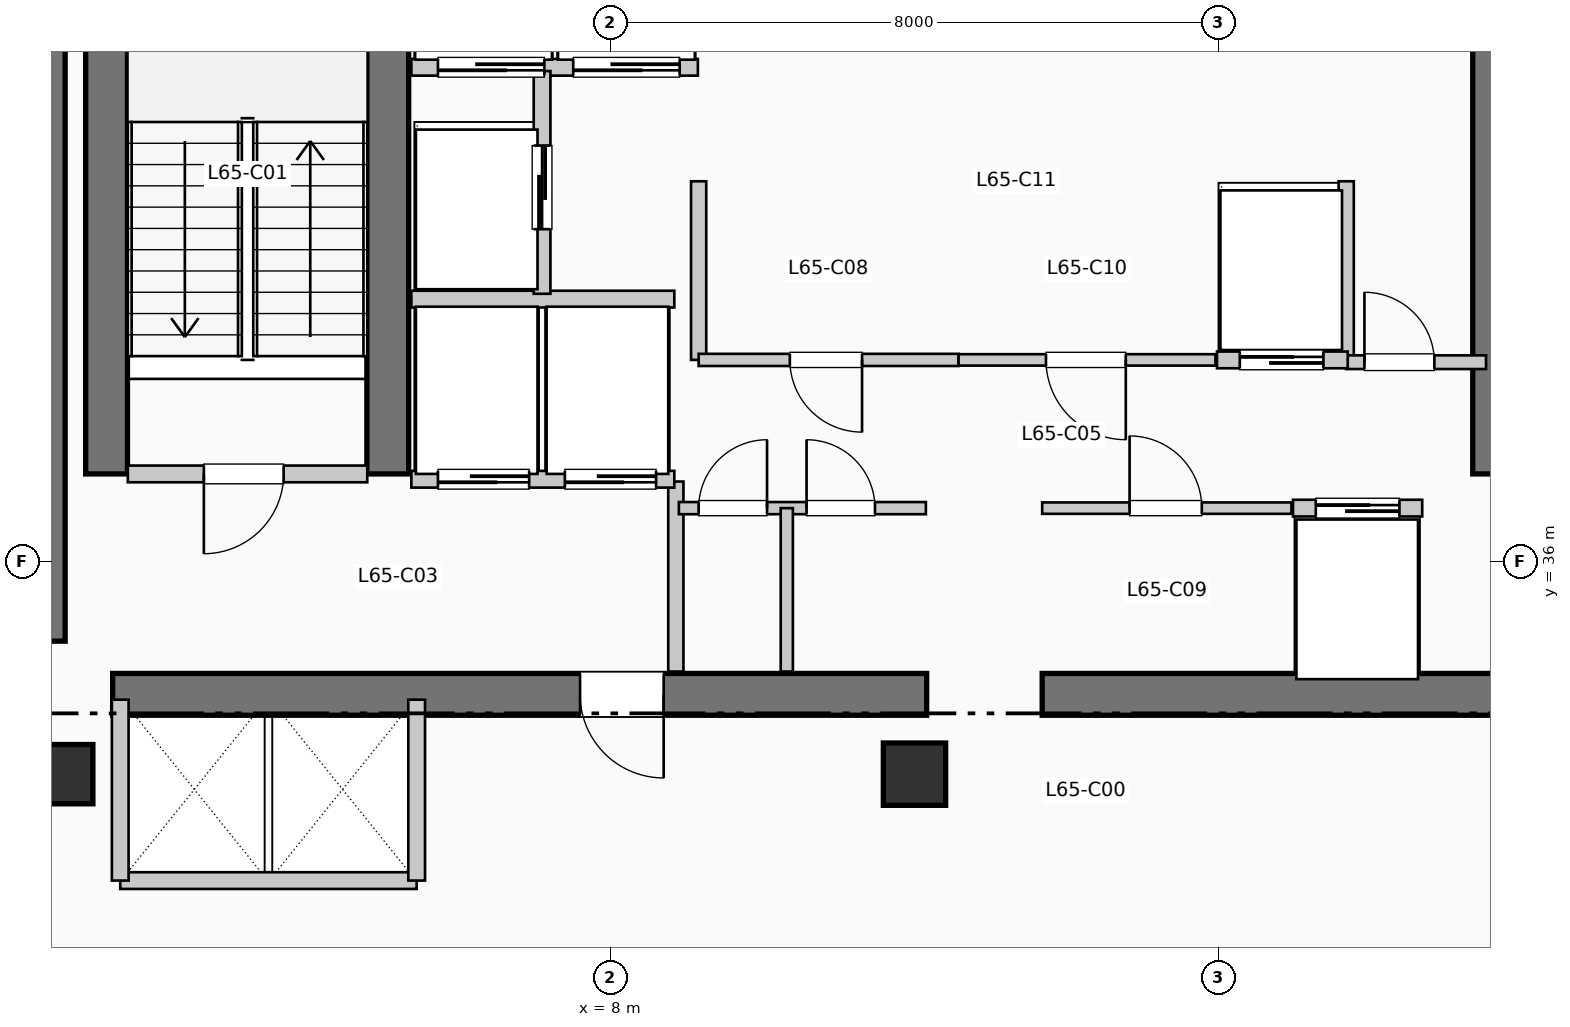
"""IFC4 building model, lengths in metres.
Left out: names, types, materials, properties, quantities, classifications, styles, units other than length and angle.
Written with IfcOpenShell. Run it as: python <this file> out.ifc"""

import sys

from ifc_helpers import new_model, si_unit, direction, frame, frame_2d, origin, origin_2d, place, context, subcontext, project, spatial, rectangle, extrude, element, fill, save


model = new_model("IFC4")
c1 = context("Model", 3, precision=1e-05, world=origin(), true_north=direction((0.0, 1.0)))
c2 = subcontext(c1, "Body", "Model", "MODEL_VIEW")
j1 = project(units=[si_unit("LENGTHUNIT", "METRE"), si_unit("PLANEANGLEUNIT", "RADIAN")], contexts=[c1])
p1 = place(None, origin())
s1 = spatial("IfcSite", under=j1, at=p1, CompositionType="ELEMENT")
p2 = place(p1, origin())
s2 = spatial("IfcBuilding", under=s1, at=p2, CompositionType="ELEMENT")
p3 = place(p2, frame((0.0, 0.0, 268.29)))
s3 = spatial("IfcBuildingStorey", under=s2, at=p3, CompositionType="ELEMENT", Elevation=268.29)
p4 = place(p3, frame((0.5, 34.95, 0.0), z_axis=(0.0, 0.0, 1.0), x_axis=(0.0, 1.0, 0.0)))
e1 = element("IfcWall", 1, at=p4, inside=s3, PredefinedType="SHEAR", context=c2, shape_type="SweptSolid", body=[
    extrude(rectangle(XDim=7.9, YDim=0.65, at=frame_2d((3.95, 0.0))), origin(), (0.0, 0.0, 1.0), 3.96),
])
p5 = place(p3, frame((1.45, 34.25, 0.0), z_axis=(0.0, 0.0, 1.0), x_axis=(1.0, 0.0, 0.0)))
e2 = element("IfcWall", 2, at=p5, inside=s3, PredefinedType="SHEAR", context=c2, shape_type="SweptSolid", body=[
    extrude(rectangle(XDim=10.71, YDim=0.55, at=frame_2d((5.355, 0.0))), origin(), (0.0, 0.0, 1.0), 3.96),
])
p6 = place(p5, frame((7.25, 0.0, 0.0), z_axis=(0.0, 0.0, 1.0), x_axis=(-1.0, 0.0, 0.0)))
e3 = element("IfcOpeningElement", 3, at=p6, cuts=e2, PredefinedType="OPENING", context=c2, shape_type="SweptSolid", body=[
    extrude(rectangle(XDim=1.1, YDim=2.15, at=frame_2d((0.55, 1.075))), frame((0.0, 0.285, 0.0), z_axis=(0.0, -1.0, 0.0), x_axis=(1.0, 0.0, 0.0)), (0.0, 0.0, 1.0), 0.57),
])
p7 = place(p3, frame((13.68, 34.25, 0.0), z_axis=(0.0, 0.0, 1.0), x_axis=(1.0, 0.0, 0.0)))
e4 = element("IfcWall", 4, at=p7, inside=s3, PredefinedType="SHEAR", context=c2, shape_type="SweptSolid", body=[
    extrude(rectangle(XDim=6.12, YDim=0.55, at=frame_2d((3.06, 0.0))), origin(), (0.0, 0.0, 1.0), 3.96),
])
for number, where, z_axis, x_axis in (
    (5, (1.37, 37.15, 0.0), (0.0, 0.0, 1.0), (0.0, 1.0, 0.0)),
    (6, (5.07, 37.15, 0.0), (0.0, 0.0, 1.0), (0.0, 1.0, 0.0)),
    (7, (19.62, 37.15, 0.0), (0.0, 0.0, 1.0), (0.0, 1.0, 0.0)),
):
    element("IfcWall", number, at=place(p3, frame(where, z_axis=z_axis, x_axis=x_axis)), inside=s3, PredefinedType="SHEAR", context=c2, shape_type="SweptSolid", body=[
        extrude(rectangle(XDim=7.89, YDim=0.55, at=frame_2d((3.945, 0.0))), origin(), (0.0, 0.0, 1.0), 3.96),
    ])
p8 = place(p3, frame((0.8, 33.2, 0.0), z_axis=(0.0, 0.0, 1.0), x_axis=(1.0, 0.0, 0.0)))
e8 = element("IfcColumn", 8, at=p8, inside=s3, PredefinedType="COLUMN", context=c2, shape_type="SweptSolid", body=[
    extrude(rectangle(XDim=0.78, YDim=0.78, at=origin_2d()), origin(), (0.0, 0.0, 1.0), 3.96),
])
p9 = place(p3, frame((12.0, 33.2, 0.0), z_axis=(0.0, 0.0, 1.0), x_axis=(1.0, 0.0, 0.0)))
e9 = element("IfcColumn", 9, at=p9, inside=s3, PredefinedType="COLUMN", context=c2, shape_type="SweptSolid", body=[
    extrude(rectangle(XDim=0.82, YDim=0.82, at=origin_2d()), origin(), (0.0, 0.0, 1.0), 3.96),
])
p10 = place(p3, frame((1.65, 37.15, 0.0), z_axis=(0.0, 0.0, 1.0), x_axis=(1.0, 0.0, 0.0)))
e10 = element("IfcWall", 10, at=p10, inside=s3, PredefinedType="PARTITIONING", context=c2, shape_type="SweptSolid", body=[
    extrude(rectangle(XDim=3.15, YDim=0.22, at=frame_2d((1.575, 0.0))), origin(), (0.0, 0.0, 1.0), 3.74),
])
p11 = place(p10, frame((2.05, 0.0, 0.0), z_axis=(0.0, 0.0, 1.0), x_axis=(-1.0, 0.0, 0.0)))
e11 = element("IfcOpeningElement", 11, at=p11, cuts=e10, PredefinedType="OPENING", context=c2, shape_type="SweptSolid", body=[
    extrude(rectangle(XDim=1.05, YDim=2.15, at=frame_2d((0.525, 1.075))), frame((0.0, 0.12, 0.0), z_axis=(0.0, -1.0, 0.0), x_axis=(1.0, 0.0, 0.0)), (0.0, 0.0, 1.0), 0.24),
])
p12 = place(p3, frame((8.86, 34.55, 0.0), z_axis=(0.0, 0.0, 1.0), x_axis=(0.0, 1.0, 0.0)))
e12 = element("IfcWall", 12, at=p12, inside=s3, PredefinedType="PARTITIONING", context=c2, shape_type="SweptSolid", body=[
    extrude(rectangle(XDim=2.5, YDim=0.2, at=frame_2d((1.25, 0.0))), origin(), (0.0, 0.0, 1.0), 3.74),
])
p13 = place(p3, frame((5.38, 37.08, 0.0), z_axis=(0.0, 0.0, 1.0), x_axis=(1.0, 0.0, 0.0)))
e13 = element("IfcWall", 13, at=p13, inside=s3, PredefinedType="PARTITIONING", context=c2, shape_type="SweptSolid", body=[
    extrude(rectangle(XDim=3.46, YDim=0.22, at=frame_2d((1.73, 0.0))), origin(), (0.0, 0.0, 1.0), 3.74),
])
p14 = place(p13, frame((1.55, 0.0, 0.0), z_axis=(0.0, 0.0, 1.0), x_axis=(-1.0, 0.0, 0.0)))
e14 = element("IfcOpeningElement", 14, at=p14, cuts=e13, PredefinedType="OPENING", context=c2, shape_type="SweptSolid", body=[
    extrude(rectangle(XDim=1.2, YDim=2.2, at=frame_2d((0.6, 1.1))), frame((0.0, 0.12, 0.0), z_axis=(0.0, -1.0, 0.0), x_axis=(1.0, 0.0, 0.0)), (0.0, 0.0, 1.0), 0.24),
])
p15 = place(p13, frame((3.22, 0.0, 0.0), z_axis=(0.0, 0.0, 1.0), x_axis=(-1.0, 0.0, 0.0)))
e15 = element("IfcOpeningElement", 15, at=p15, cuts=e13, PredefinedType="OPENING", context=c2, shape_type="SweptSolid", body=[
    extrude(rectangle(XDim=1.2, YDim=2.2, at=frame_2d((0.6, 1.1))), frame((0.0, 0.12, 0.0), z_axis=(0.0, -1.0, 0.0), x_axis=(1.0, 0.0, 0.0)), (0.0, 0.0, 1.0), 0.24),
])
p16 = place(p3, frame((5.38, 39.45, 0.0), z_axis=(0.0, 0.0, 1.0), x_axis=(1.0, 0.0, 0.0)))
e16 = element("IfcWall", 16, at=p16, inside=s3, PredefinedType="PARTITIONING", context=c2, shape_type="SweptSolid", body=[
    extrude(rectangle(XDim=3.46, YDim=0.22, at=frame_2d((1.73, 0.0))), origin(), (0.0, 0.0, 1.0), 3.74),
])
p17 = place(p3, frame((5.38, 42.5, 0.0), z_axis=(0.0, 0.0, 1.0), x_axis=(1.0, 0.0, 0.0)))
e17 = element("IfcWall", 17, at=p17, inside=s3, PredefinedType="PARTITIONING", context=c2, shape_type="SweptSolid", body=[
    extrude(rectangle(XDim=3.77, YDim=0.22, at=frame_2d((1.885, 0.0))), origin(), (0.0, 0.0, 1.0), 3.74),
])
p18 = place(p17, frame((1.75, 0.0, 0.0), z_axis=(0.0, 0.0, 1.0), x_axis=(-1.0, 0.0, 0.0)))
e18 = element("IfcOpeningElement", 18, at=p18, cuts=e17, PredefinedType="OPENING", context=c2, shape_type="SweptSolid", body=[
    extrude(rectangle(XDim=1.4, YDim=2.2, at=frame_2d((0.7, 1.1))), frame((0.0, 0.12, 0.0), z_axis=(0.0, -1.0, 0.0), x_axis=(1.0, 0.0, 0.0)), (0.0, 0.0, 1.0), 0.24),
])
p19 = place(p17, frame((3.53, 0.0, 0.0), z_axis=(0.0, 0.0, 1.0), x_axis=(-1.0, 0.0, 0.0)))
e19 = element("IfcOpeningElement", 19, at=p19, cuts=e17, PredefinedType="OPENING", context=c2, shape_type="SweptSolid", body=[
    extrude(rectangle(XDim=1.4, YDim=2.2, at=frame_2d((0.7, 1.1))), frame((0.0, 0.12, 0.0), z_axis=(0.0, -1.0, 0.0), x_axis=(1.0, 0.0, 0.0)), (0.0, 0.0, 1.0), 0.24),
])
p20 = place(p3, frame((7.1, 39.52, 0.0), z_axis=(0.0, 0.0, 1.0), x_axis=(0.0, 1.0, 0.0)))
e20 = element("IfcWall", 20, at=p20, inside=s3, PredefinedType="PARTITIONING", context=c2, shape_type="SweptSolid", body=[
    extrude(rectangle(XDim=2.93, YDim=0.22, at=frame_2d((1.465, 0.0))), origin(), (0.0, 0.0, 1.0), 3.74),
])
p21 = place(p20, frame((0.85, 0.0, 0.0)))
e21 = element("IfcOpeningElement", 21, at=p21, cuts=e20, PredefinedType="OPENING", context=c2, shape_type="SweptSolid", body=[
    extrude(rectangle(XDim=1.1, YDim=2.2, at=frame_2d((0.55, 1.1))), frame((0.0, 0.12, 0.0), z_axis=(0.0, -1.0, 0.0), x_axis=(1.0, 0.0, 0.0)), (0.0, 0.0, 1.0), 0.24),
])
p22 = place(p3, frame((1.55, 31.8, 0.0), z_axis=(0.0, 0.0, 1.0), x_axis=(1.0, 0.0, 0.0)))
e22 = element("IfcWall", 22, at=p22, inside=s3, PredefinedType="PARTITIONING", context=c2, shape_type="SweptSolid", body=[
    extrude(rectangle(XDim=3.9, YDim=0.22, at=frame_2d((1.95, 0.0))), origin(), (0.0, 0.0, 1.0), 3.74),
])
for number, where, z_axis, x_axis in (
    (23, (1.55, 31.8, 0.0), (0.0, 0.0, 1.0), (0.0, 1.0, 0.0)),
    (24, (5.45, 31.8, 0.0), (0.0, 0.0, 1.0), (0.0, 1.0, 0.0)),
):
    element("IfcWall", number, at=place(p3, frame(where, z_axis=z_axis, x_axis=x_axis)), inside=s3, PredefinedType="PARTITIONING", context=c2, shape_type="SweptSolid", body=[
        extrude(rectangle(XDim=2.38, YDim=0.22, at=frame_2d((1.19, 0.0))), origin(), (0.0, 0.0, 1.0), 3.74),
    ])
for number, where, z_axis, x_axis in (
    (25, (9.16, 38.65, 0.0), (0.0, 0.0, 1.0), (0.0, 1.0, 0.0)),
    (26, (17.68, 38.65, 0.0), (0.0, 0.0, 1.0), (0.0, 1.0, 0.0)),
):
    element("IfcWall", number, at=place(p3, frame(where, z_axis=z_axis, x_axis=x_axis)), inside=s3, PredefinedType="PARTITIONING", context=c2, shape_type="SweptSolid", body=[
        extrude(rectangle(XDim=2.35, YDim=0.2, at=frame_2d((1.175, 0.0))), origin(), (0.0, 0.0, 1.0), 3.74),
    ])
p23 = place(p3, frame((17.68, 38.62, 0.0), z_axis=(0.0, 0.0, 1.0), x_axis=(1.0, 0.0, 0.0)))
e27 = element("IfcWall", 27, at=p23, inside=s3, PredefinedType="PARTITIONING", context=c2, shape_type="SweptSolid", body=[
    extrude(rectangle(XDim=1.84, YDim=0.18, at=frame_2d((0.92, 0.0))), origin(), (0.0, 0.0, 1.0), 3.74),
])
p24 = place(p23, frame((0.24, 0.0, 0.0)))
e28 = element("IfcOpeningElement", 28, at=p24, cuts=e27, PredefinedType="OPENING", context=c2, shape_type="SweptSolid", body=[
    extrude(rectangle(XDim=0.92, YDim=2.1, at=frame_2d((0.46, 1.05))), frame((0.0, 0.1, 0.0), z_axis=(0.0, -1.0, 0.0), x_axis=(1.0, 0.0, 0.0)), (0.0, 0.0, 1.0), 0.2),
])
p25 = place(p3, frame((8.9, 36.7, 0.0), z_axis=(0.0, 0.0, 1.0), x_axis=(1.0, 0.0, 0.0)))
e29 = element("IfcWall", 29, at=p25, inside=s3, PredefinedType="PARTITIONING", context=c2, shape_type="SweptSolid", body=[
    extrude(rectangle(XDim=3.25, YDim=0.16, at=frame_2d((1.625, 0.0))), origin(), (0.0, 0.0, 1.0), 3.74),
])
p26 = place(p25, frame((0.26, 0.0, 0.0)))
e30 = element("IfcOpeningElement", 30, at=p26, cuts=e29, PredefinedType="OPENING", context=c2, shape_type="SweptSolid", body=[
    extrude(rectangle(XDim=0.9, YDim=2.15, at=frame_2d((0.45, 1.075))), frame((0.0, 0.09, 0.0), z_axis=(0.0, -1.0, 0.0), x_axis=(1.0, 0.0, 0.0)), (0.0, 0.0, 1.0), 0.18),
])
p27 = place(p25, frame((1.68, 0.0, 0.0)))
e31 = element("IfcOpeningElement", 31, at=p27, cuts=e29, PredefinedType="OPENING", context=c2, shape_type="SweptSolid", body=[
    extrude(rectangle(XDim=0.9, YDim=2.15, at=frame_2d((0.45, 1.075))), frame((0.0, 0.09, 0.0), z_axis=(0.0, -1.0, 0.0), x_axis=(1.0, 0.0, 0.0)), (0.0, 0.0, 1.0), 0.18),
])
p28 = place(p3, frame((10.32, 34.55, 0.0), z_axis=(0.0, 0.0, 1.0), x_axis=(0.0, 1.0, 0.0)))
e32 = element("IfcWall", 32, at=p28, inside=s3, PredefinedType="PARTITIONING", context=c2, shape_type="SweptSolid", body=[
    extrude(rectangle(XDim=2.15, YDim=0.16, at=frame_2d((1.075, 0.0))), origin(), (0.0, 0.0, 1.0), 3.74),
])
p29 = place(p3, frame((9.16, 38.65, 0.0), z_axis=(0.0, 0.0, 1.0), x_axis=(1.0, 0.0, 0.0)))
e33 = element("IfcWall", 33, at=p29, inside=s3, PredefinedType="PARTITIONING", context=c2, shape_type="SweptSolid", body=[
    extrude(rectangle(XDim=3.42, YDim=0.16, at=frame_2d((1.71, 0.0))), origin(), (0.0, 0.0, 1.0), 3.74),
])
p30 = place(p29, frame((2.15, 0.0, 0.0), z_axis=(0.0, 0.0, 1.0), x_axis=(-1.0, 0.0, 0.0)))
e34 = element("IfcOpeningElement", 34, at=p30, cuts=e33, PredefinedType="OPENING", context=c2, shape_type="SweptSolid", body=[
    extrude(rectangle(XDim=0.95, YDim=2.15, at=frame_2d((0.475, 1.075))), frame((0.0, 0.09, 0.0), z_axis=(0.0, -1.0, 0.0), x_axis=(1.0, 0.0, 0.0)), (0.0, 0.0, 1.0), 0.18),
])
p31 = place(p3, frame((13.68, 36.7, 0.0), z_axis=(0.0, 0.0, 1.0), x_axis=(1.0, 0.0, 0.0)))
e35 = element("IfcWall", 35, at=p31, inside=s3, PredefinedType="PARTITIONING", context=c2, shape_type="SweptSolid", body=[
    extrude(rectangle(XDim=3.28, YDim=0.15, at=frame_2d((1.64, 0.0))), origin(), (0.0, 0.0, 1.0), 3.74),
])
p32 = place(p31, frame((1.15, 0.0, 0.0)))
e36 = element("IfcOpeningElement", 36, at=p32, cuts=e35, PredefinedType="OPENING", context=c2, shape_type="SweptSolid", body=[
    extrude(rectangle(XDim=0.95, YDim=2.15, at=frame_2d((0.475, 1.075))), frame((0.0, 0.085, 0.0), z_axis=(0.0, -1.0, 0.0), x_axis=(1.0, 0.0, 0.0)), (0.0, 0.0, 1.0), 0.17),
])
p33 = place(p3, frame((12.58, 38.65, 0.0), z_axis=(0.0, 0.0, 1.0), x_axis=(1.0, 0.0, 0.0)))
e37 = element("IfcWall", 37, at=p33, inside=s3, PredefinedType="PARTITIONING", context=c2, shape_type="SweptSolid", body=[
    extrude(rectangle(XDim=3.38, YDim=0.15, at=frame_2d((1.69, 0.0))), origin(), (0.0, 0.0, 1.0), 3.74),
])
p34 = place(p33, frame((2.2, 0.0, 0.0), z_axis=(0.0, 0.0, 1.0), x_axis=(-1.0, 0.0, 0.0)))
e38 = element("IfcOpeningElement", 38, at=p34, cuts=e37, PredefinedType="OPENING", context=c2, shape_type="SweptSolid", body=[
    extrude(rectangle(XDim=1.05, YDim=2.15, at=frame_2d((0.525, 1.075))), frame((0.0, 0.085, 0.0), z_axis=(0.0, -1.0, 0.0), x_axis=(1.0, 0.0, 0.0)), (0.0, 0.0, 1.0), 0.17),
])
p35 = place(p3, frame((16.98, 36.7, 0.0), z_axis=(0.0, 0.0, 1.0), x_axis=(1.0, 0.0, 0.0)))
e39 = element("IfcWall", 39, at=p35, inside=s3, PredefinedType="PARTITIONING", context=c2, shape_type="SweptSolid", body=[
    extrude(rectangle(XDim=1.7, YDim=0.22, at=frame_2d((0.85, 0.0))), origin(), (0.0, 0.0, 1.0), 3.74),
])
p36 = place(p35, frame((0.3, 0.0, 0.0)))
e40 = element("IfcOpeningElement", 40, at=p36, cuts=e39, PredefinedType="OPENING", context=c2, shape_type="SweptSolid", body=[
    extrude(rectangle(XDim=1.1, YDim=2.2, at=frame_2d((0.55, 1.1))), frame((0.0, 0.12, 0.0), z_axis=(0.0, -1.0, 0.0), x_axis=(1.0, 0.0, 0.0)), (0.0, 0.0, 1.0), 0.24),
])
p37 = place(p3, frame((15.98, 38.65, 0.0), z_axis=(0.0, 0.0, 1.0), x_axis=(1.0, 0.0, 0.0)))
e41 = element("IfcWall", 41, at=p37, inside=s3, PredefinedType="PARTITIONING", context=c2, shape_type="SweptSolid", body=[
    extrude(rectangle(XDim=1.72, YDim=0.22, at=frame_2d((0.86, 0.0))), origin(), (0.0, 0.0, 1.0), 3.74),
])
p38 = place(p37, frame((0.3, 0.0, 0.0)))
e42 = element("IfcOpeningElement", 42, at=p38, cuts=e41, PredefinedType="OPENING", context=c2, shape_type="SweptSolid", body=[
    extrude(rectangle(XDim=1.1, YDim=2.2, at=frame_2d((0.55, 1.1))), frame((0.0, 0.12, 0.0), z_axis=(0.0, -1.0, 0.0), x_axis=(1.0, 0.0, 0.0)), (0.0, 0.0, 1.0), 0.24),
])
p39 = place(p11, origin())
e43 = element("IfcDoor", 43, at=p39, inside=s3, OperationType="SINGLE_SWING_LEFT", PredefinedType="DOOR", context=c2, shape_type="SweptSolid", body=[
    extrude(rectangle(XDim=1.05, YDim=2.15, at=frame_2d((0.525, 1.075))), frame((0.0, 0.025, 0.0), z_axis=(0.0, -1.0, 0.0), x_axis=(1.0, 0.0, 0.0)), (0.0, 0.0, 1.0), 0.05),
])
fill(e11, e43)
p40 = place(p6, origin())
e44 = element("IfcDoor", 44, at=p40, inside=s3, OperationType="SINGLE_SWING_RIGHT", PredefinedType="DOOR", context=c2, shape_type="SweptSolid", body=[
    extrude(rectangle(XDim=1.1, YDim=2.15, at=frame_2d((0.55, 1.075))), frame((0.0, 0.025, 0.0), z_axis=(0.0, -1.0, 0.0), x_axis=(1.0, 0.0, 0.0)), (0.0, 0.0, 1.0), 0.05),
])
fill(e3, e44)
p41 = place(p14, origin())
e45 = element("IfcDoor", 45, at=p41, inside=s3, OperationType="SLIDING_TO_RIGHT", PredefinedType="DOOR", context=c2, shape_type="SweptSolid", body=[
    extrude(rectangle(XDim=1.2, YDim=2.2, at=frame_2d((0.6, 1.1))), frame((0.0, 0.025, 0.0), z_axis=(0.0, -1.0, 0.0), x_axis=(1.0, 0.0, 0.0)), (0.0, 0.0, 1.0), 0.05),
])
fill(e14, e45)
p42 = place(p15, origin())
e46 = element("IfcDoor", 46, at=p42, inside=s3, OperationType="SLIDING_TO_RIGHT", PredefinedType="DOOR", context=c2, shape_type="SweptSolid", body=[
    extrude(rectangle(XDim=1.2, YDim=2.2, at=frame_2d((0.6, 1.1))), frame((0.0, 0.025, 0.0), z_axis=(0.0, -1.0, 0.0), x_axis=(1.0, 0.0, 0.0)), (0.0, 0.0, 1.0), 0.05),
])
fill(e15, e46)
p43 = place(p18, origin())
e47 = element("IfcDoor", 47, at=p43, inside=s3, OperationType="SLIDING_TO_LEFT", PredefinedType="DOOR", context=c2, shape_type="SweptSolid", body=[
    extrude(rectangle(XDim=1.4, YDim=2.2, at=frame_2d((0.7, 1.1))), frame((0.0, 0.025, 0.0), z_axis=(0.0, -1.0, 0.0), x_axis=(1.0, 0.0, 0.0)), (0.0, 0.0, 1.0), 0.05),
])
fill(e18, e47)
p44 = place(p19, origin())
e48 = element("IfcDoor", 48, at=p44, inside=s3, OperationType="SLIDING_TO_LEFT", PredefinedType="DOOR", context=c2, shape_type="SweptSolid", body=[
    extrude(rectangle(XDim=1.4, YDim=2.2, at=frame_2d((0.7, 1.1))), frame((0.0, 0.025, 0.0), z_axis=(0.0, -1.0, 0.0), x_axis=(1.0, 0.0, 0.0)), (0.0, 0.0, 1.0), 0.05),
])
fill(e19, e48)
p45 = place(p21, origin())
e49 = element("IfcDoor", 49, at=p45, inside=s3, OperationType="SLIDING_TO_LEFT", PredefinedType="DOOR", context=c2, shape_type="SweptSolid", body=[
    extrude(rectangle(XDim=1.1, YDim=2.2, at=frame_2d((0.55, 1.1))), frame((0.0, 0.025, 0.0), z_axis=(0.0, -1.0, 0.0), x_axis=(1.0, 0.0, 0.0)), (0.0, 0.0, 1.0), 0.05),
])
fill(e21, e49)
p46 = place(p24, origin())
e50 = element("IfcDoor", 50, at=p46, inside=s3, OperationType="SINGLE_SWING_LEFT", PredefinedType="DOOR", context=c2, shape_type="SweptSolid", body=[
    extrude(rectangle(XDim=0.92, YDim=2.1, at=frame_2d((0.46, 1.05))), frame((0.0, 0.025, 0.0), z_axis=(0.0, -1.0, 0.0), x_axis=(1.0, 0.0, 0.0)), (0.0, 0.0, 1.0), 0.05),
])
fill(e28, e50)
p47 = place(p26, origin())
e51 = element("IfcDoor", 51, at=p47, inside=s3, OperationType="SINGLE_SWING_RIGHT", PredefinedType="DOOR", context=c2, shape_type="SweptSolid", body=[
    extrude(rectangle(XDim=0.9, YDim=2.15, at=frame_2d((0.45, 1.075))), frame((0.0, 0.025, 0.0), z_axis=(0.0, -1.0, 0.0), x_axis=(1.0, 0.0, 0.0)), (0.0, 0.0, 1.0), 0.05),
])
fill(e30, e51)
p48 = place(p27, origin())
e52 = element("IfcDoor", 52, at=p48, inside=s3, OperationType="SINGLE_SWING_LEFT", PredefinedType="DOOR", context=c2, shape_type="SweptSolid", body=[
    extrude(rectangle(XDim=0.9, YDim=2.15, at=frame_2d((0.45, 1.075))), frame((0.0, 0.025, 0.0), z_axis=(0.0, -1.0, 0.0), x_axis=(1.0, 0.0, 0.0)), (0.0, 0.0, 1.0), 0.05),
])
fill(e31, e52)
p49 = place(p30, origin())
e53 = element("IfcDoor", 53, at=p49, inside=s3, OperationType="SINGLE_SWING_RIGHT", PredefinedType="DOOR", context=c2, shape_type="SweptSolid", body=[
    extrude(rectangle(XDim=0.95, YDim=2.15, at=frame_2d((0.475, 1.075))), frame((0.0, 0.025, 0.0), z_axis=(0.0, -1.0, 0.0), x_axis=(1.0, 0.0, 0.0)), (0.0, 0.0, 1.0), 0.05),
])
fill(e34, e53)
p50 = place(p32, origin())
e54 = element("IfcDoor", 54, at=p50, inside=s3, OperationType="SINGLE_SWING_LEFT", PredefinedType="DOOR", context=c2, shape_type="SweptSolid", body=[
    extrude(rectangle(XDim=0.95, YDim=2.15, at=frame_2d((0.475, 1.075))), frame((0.0, 0.025, 0.0), z_axis=(0.0, -1.0, 0.0), x_axis=(1.0, 0.0, 0.0)), (0.0, 0.0, 1.0), 0.05),
])
fill(e36, e54)
p51 = place(p34, origin())
e55 = element("IfcDoor", 55, at=p51, inside=s3, OperationType="SINGLE_SWING_RIGHT", PredefinedType="DOOR", context=c2, shape_type="SweptSolid", body=[
    extrude(rectangle(XDim=1.05, YDim=2.15, at=frame_2d((0.525, 1.075))), frame((0.0, 0.025, 0.0), z_axis=(0.0, -1.0, 0.0), x_axis=(1.0, 0.0, 0.0)), (0.0, 0.0, 1.0), 0.05),
])
fill(e38, e55)
p52 = place(p36, origin())
e56 = element("IfcDoor", 56, at=p52, inside=s3, OperationType="SLIDING_TO_LEFT", PredefinedType="DOOR", context=c2, shape_type="SweptSolid", body=[
    extrude(rectangle(XDim=1.1, YDim=2.2, at=frame_2d((0.55, 1.1))), frame((0.0, 0.025, 0.0), z_axis=(0.0, -1.0, 0.0), x_axis=(1.0, 0.0, 0.0)), (0.0, 0.0, 1.0), 0.05),
])
fill(e40, e56)
p53 = place(p38, origin())
e57 = element("IfcDoor", 57, at=p53, inside=s3, OperationType="SLIDING_TO_LEFT", PredefinedType="DOOR", context=c2, shape_type="SweptSolid", body=[
    extrude(rectangle(XDim=1.1, YDim=2.2, at=frame_2d((0.55, 1.1))), frame((0.0, 0.025, 0.0), z_axis=(0.0, -1.0, 0.0), x_axis=(1.0, 0.0, 0.0)), (0.0, 0.0, 1.0), 0.05),
])
fill(e42, e57)
save(model, sys.argv[1])
